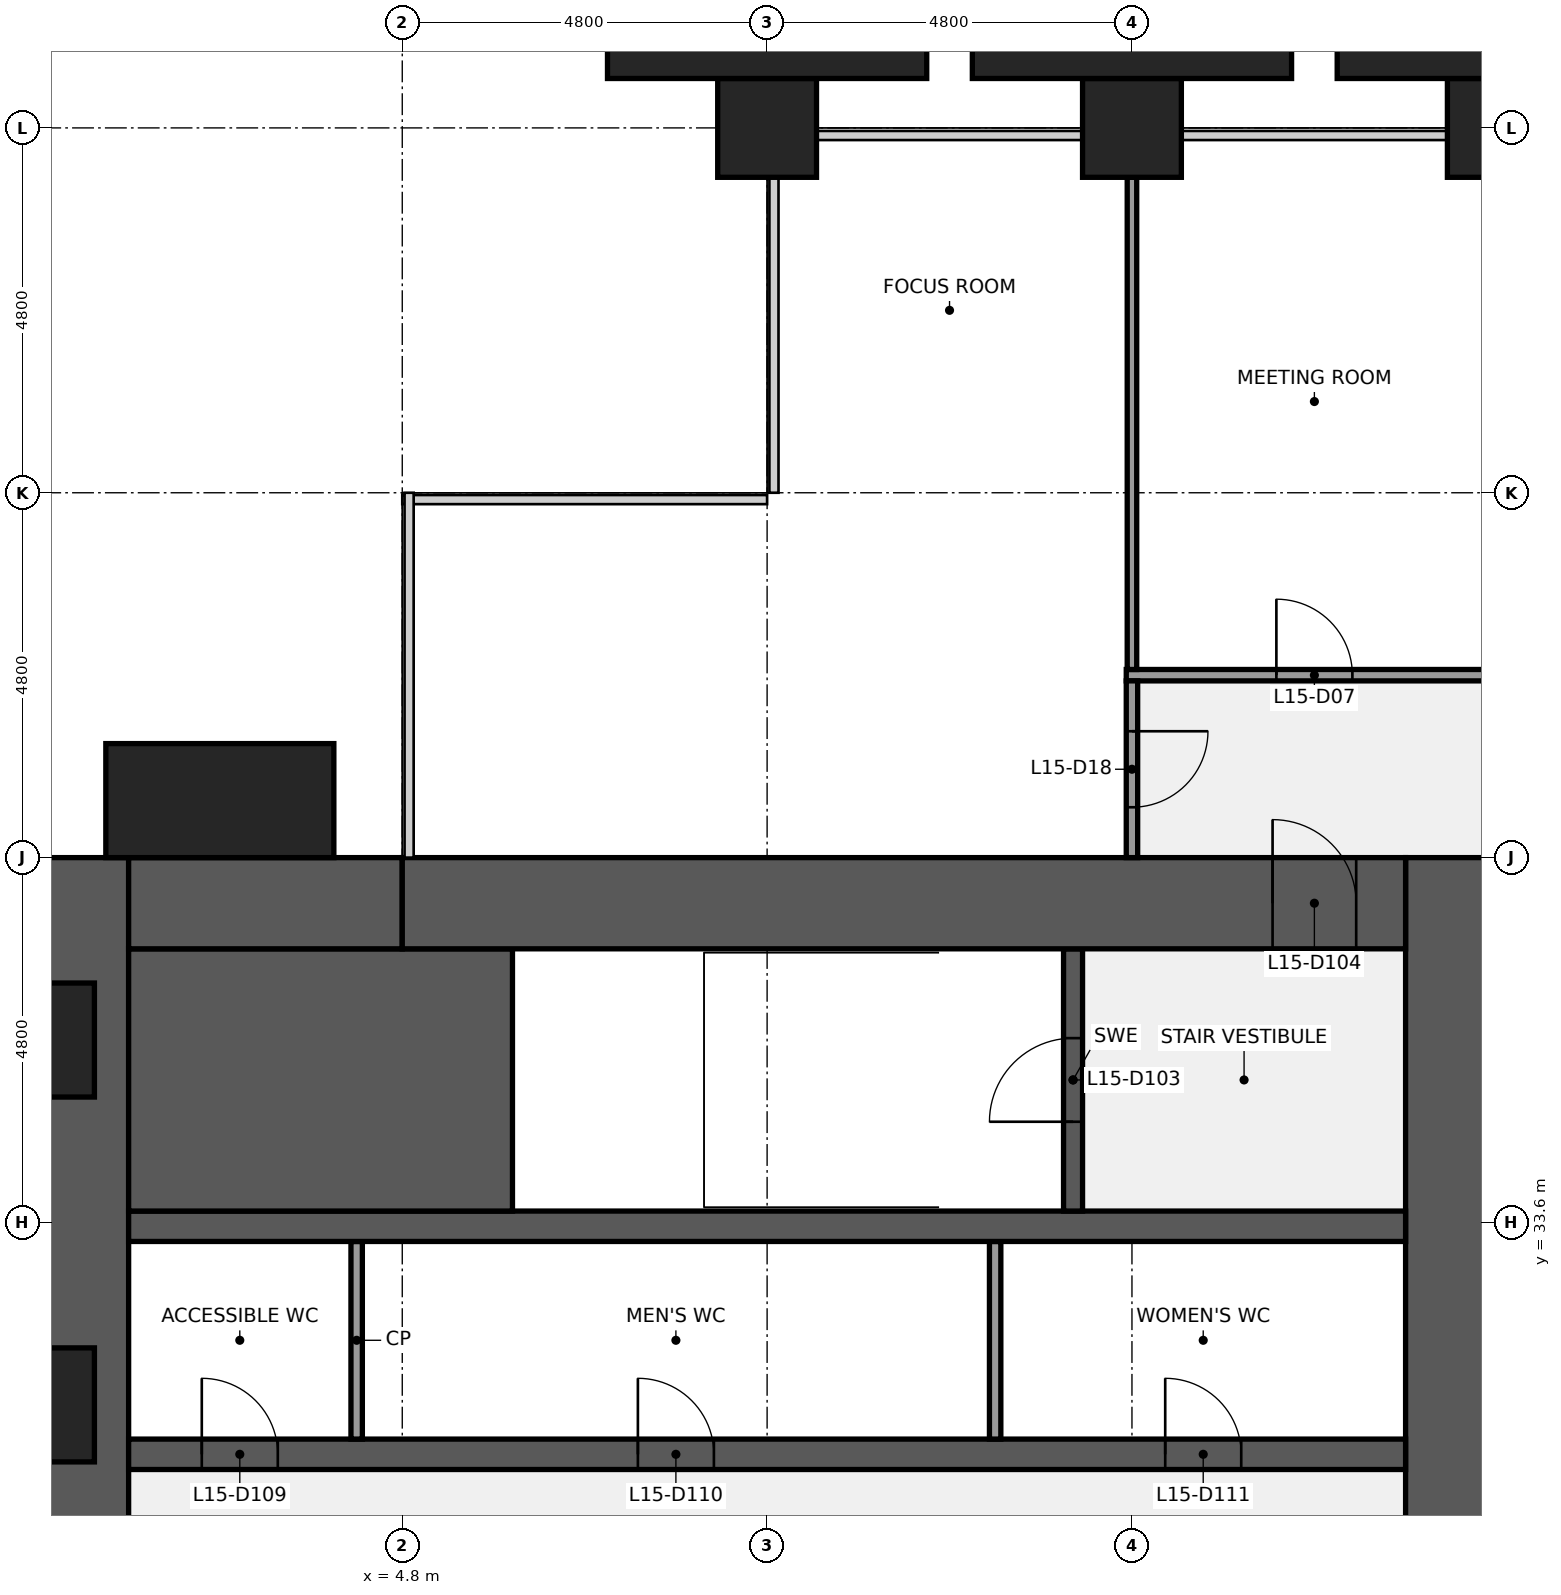
"""IFC4 building model, lengths in metres.
Left out: names, types, materials, properties, quantities, classifications, styles, units other than length and angle.
Written with IfcOpenShell. Run it as: python <this file> out.ifc"""

import sys

from ifc_helpers import new_model, si_unit, direction, frame, frame_2d, origin, origin_2d, place, context, subcontext, project, spatial, rectangle, extrude, element, fill, save


model = new_model("IFC4")
c1 = context("Model", 3, precision=1e-05, world=origin(), true_north=direction((0.0, 1.0)))
c2 = subcontext(c1, "Body", "Model", "MODEL_VIEW")
j1 = project(units=[si_unit("LENGTHUNIT", "METRE"), si_unit("PLANEANGLEUNIT", "RADIAN")], contexts=[c1])
p1 = place(None, origin())
s1 = spatial("IfcSite", under=j1, at=p1, CompositionType="ELEMENT")
p2 = place(p1, origin())
s2 = spatial("IfcBuilding", under=s1, at=p2, CompositionType="ELEMENT")
p3 = place(p2, frame((0.0, 0.0, 71.0)))
s3 = spatial("IfcBuildingStorey", under=s2, at=p3, CompositionType="ELEMENT", Elevation=71.0)
for number, where, z_axis, x_axis in (
    (1, (9.6, 48.0, 0.0), (0.0, 0.0, 1.0), (1.0, 0.0, 0.0)),
    (2, (14.4, 48.0, 0.0), (0.0, 0.0, 1.0), (1.0, 0.0, 0.0)),
    (3, (19.2, 48.0, 0.0), (0.0, 0.0, 1.0), (1.0, 0.0, 0.0)),
):
    element("IfcColumn", number, at=place(p3, frame(where, z_axis=z_axis, x_axis=x_axis)), inside=s3, PredefinedType="COLUMN", context=c2, shape_type="SweptSolid", body=[
        extrude(rectangle(XDim=1.3, YDim=1.3, at=origin_2d()), origin(), (0.0, 0.0, 1.0), 4.0),
    ])
p4 = place(p3, frame((0.6, 9.6, 0.0), z_axis=(0.0, 0.0, 1.0), x_axis=(0.0, 1.0, 0.0)))
e4 = element("IfcWall", 4, at=p4, inside=s3, PredefinedType="SHEAR", context=c2, shape_type="SweptSolid", body=[
    extrude(rectangle(XDim=28.8, YDim=1.2, at=frame_2d((14.4, 0.0))), origin(), (0.0, 0.0, 1.0), 3.84),
])
p5 = place(p4, frame((8.85, 0.0, 0.9)))
e5 = element("IfcOpeningElement", 5, at=p5, cuts=e4, PredefinedType="OPENING", context=c2, shape_type="SweptSolid", body=[
    extrude(rectangle(XDim=1.5, YDim=1.5, at=frame_2d((0.75, 0.75))), frame((0.0, 0.61, 0.0), z_axis=(0.0, -1.0, 0.0), x_axis=(1.0, 0.0, 0.0)), (0.0, 0.0, 1.0), 1.22),
])
p6 = place(p4, frame((18.45, 0.0, 0.9)))
e6 = element("IfcOpeningElement", 6, at=p6, cuts=e4, PredefinedType="OPENING", context=c2, shape_type="SweptSolid", body=[
    extrude(rectangle(XDim=1.5, YDim=1.5, at=frame_2d((0.75, 0.75))), frame((0.0, 0.61, 0.0), z_axis=(0.0, -1.0, 0.0), x_axis=(1.0, 0.0, 0.0)), (0.0, 0.0, 1.0), 1.22),
])
p7 = place(p3, frame((18.6, 38.4, 0.0), z_axis=(0.0, 0.0, 1.0), x_axis=(0.0, -1.0, 0.0)))
e7 = element("IfcWall", 7, at=p7, inside=s3, PredefinedType="SHEAR", context=c2, shape_type="SweptSolid", body=[
    extrude(rectangle(XDim=28.8, YDim=1.2, at=frame_2d((14.4, 0.0))), origin(), (0.0, 0.0, 1.0), 3.84),
])
p8 = place(p7, frame((18.3, 0.0, 0.0)))
e8 = element("IfcOpeningElement", 8, at=p8, cuts=e7, PredefinedType="OPENING", context=c2, shape_type="SweptSolid", body=[
    extrude(rectangle(XDim=1.8, YDim=2.1, at=frame_2d((0.9, 1.05))), frame((0.0, 0.61, 0.0), z_axis=(0.0, -1.0, 0.0), x_axis=(1.0, 0.0, 0.0)), (0.0, 0.0, 1.0), 1.22),
])
p9 = place(p7, frame((8.7, 0.0, 0.0)))
e9 = element("IfcOpeningElement", 9, at=p9, cuts=e7, PredefinedType="OPENING", context=c2, shape_type="SweptSolid", body=[
    extrude(rectangle(XDim=1.8, YDim=2.1, at=frame_2d((0.9, 1.05))), frame((0.0, 0.61, 0.0), z_axis=(0.0, -1.0, 0.0), x_axis=(1.0, 0.0, 0.0)), (0.0, 0.0, 1.0), 1.22),
])
p10 = place(p3, frame((1.2, 30.55, 0.0), z_axis=(0.0, 0.0, 1.0), x_axis=(1.0, 0.0, 0.0)))
e10 = element("IfcWall", 10, at=p10, inside=s3, PredefinedType="SHEAR", context=c2, shape_type="SweptSolid", body=[
    extrude(rectangle(XDim=16.8, YDim=0.4, at=frame_2d((8.4, 0.0))), origin(), (0.0, 0.0, 1.0), 3.84),
])
p11 = place(p10, frame((0.962, 0.0, 0.0)))
e11 = element("IfcOpeningElement", 11, at=p11, cuts=e10, PredefinedType="OPENING", context=c2, shape_type="SweptSolid", body=[
    extrude(rectangle(XDim=1.0, YDim=2.1, at=frame_2d((0.5, 1.05))), frame((0.0, 0.21, 0.0), z_axis=(0.0, -1.0, 0.0), x_axis=(1.0, 0.0, 0.0)), (0.0, 0.0, 1.0), 0.42),
])
p12 = place(p10, frame((6.7, 0.0, 0.0)))
e12 = element("IfcOpeningElement", 12, at=p12, cuts=e10, PredefinedType="OPENING", context=c2, shape_type="SweptSolid", body=[
    extrude(rectangle(XDim=1.0, YDim=2.1, at=frame_2d((0.5, 1.05))), frame((0.0, 0.21, 0.0), z_axis=(0.0, -1.0, 0.0), x_axis=(1.0, 0.0, 0.0)), (0.0, 0.0, 1.0), 0.42),
])
p13 = place(p10, frame((13.637, 0.0, 0.0)))
e13 = element("IfcOpeningElement", 13, at=p13, cuts=e10, PredefinedType="OPENING", context=c2, shape_type="SweptSolid", body=[
    extrude(rectangle(XDim=1.0, YDim=2.1, at=frame_2d((0.5, 1.05))), frame((0.0, 0.21, 0.0), z_axis=(0.0, -1.0, 0.0), x_axis=(1.0, 0.0, 0.0)), (0.0, 0.0, 1.0), 0.42),
])
for number, where, z_axis, x_axis in (
    (14, (4.2, 30.75, 0.0), (0.0, 0.0, 1.0), (0.0, 1.0, 0.0)),
    (15, (12.6, 30.75, 0.0), (0.0, 0.0, 1.0), (0.0, 1.0, 0.0)),
):
    element("IfcWall", number, at=place(p3, frame(where, z_axis=z_axis, x_axis=x_axis)), inside=s3, PredefinedType="PARTITIONING", context=c2, shape_type="SweptSolid", body=[
        extrude(rectangle(XDim=2.6, YDim=0.15, at=frame_2d((1.3, 0.0))), origin(), (0.0, 0.0, 1.0), 3.84),
    ])
p14 = place(p3, frame((1.2, 33.55, 0.0), z_axis=(0.0, 0.0, 1.0), x_axis=(1.0, 0.0, 0.0)))
e16 = element("IfcWall", 16, at=p14, inside=s3, PredefinedType="SHEAR", context=c2, shape_type="SweptSolid", body=[
    extrude(rectangle(XDim=16.8, YDim=0.4, at=frame_2d((8.4, 0.0))), origin(), (0.0, 0.0, 1.0), 3.84),
])
p15 = place(p3, frame((1.2, 35.475, 0.0), z_axis=(0.0, 0.0, 1.0), x_axis=(1.0, 0.0, 0.0)))
e17 = element("IfcWall", 17, at=p15, inside=s3, PredefinedType="SHEAR", context=c2, shape_type="SweptSolid", body=[
    extrude(rectangle(XDim=5.05, YDim=3.45, at=frame_2d((2.525, 0.0))), origin(), (0.0, 0.0, 1.0), 3.84),
])
p16 = place(p3, frame((13.625, 33.75, 0.0), z_axis=(0.0, 0.0, 1.0), x_axis=(0.0, 1.0, 0.0)))
e18 = element("IfcWall", 18, at=p16, inside=s3, PredefinedType="SHEAR", context=c2, shape_type="SweptSolid", body=[
    extrude(rectangle(XDim=3.45, YDim=0.25, at=frame_2d((1.725, 0.0))), origin(), (0.0, 0.0, 1.0), 3.84),
])
p17 = place(p16, frame((1.175, 0.0, 0.0)))
e19 = element("IfcOpeningElement", 19, at=p17, cuts=e18, PredefinedType="OPENING", context=c2, shape_type="SweptSolid", body=[
    extrude(rectangle(XDim=1.1, YDim=2.1, at=frame_2d((0.55, 1.05))), frame((0.0, 0.135, 0.0), z_axis=(0.0, -1.0, 0.0), x_axis=(1.0, 0.0, 0.0)), (0.0, 0.0, 1.0), 0.27),
])
p18 = place(p3, frame((1.2, 37.8, 0.0), z_axis=(0.0, 0.0, 1.0), x_axis=(1.0, 0.0, 0.0)))
e20 = element("IfcWall", 20, at=p18, inside=s3, PredefinedType="SHEAR", context=c2, shape_type="SweptSolid", body=[
    extrude(rectangle(XDim=3.6, YDim=1.2, at=frame_2d((1.8, 0.0))), origin(), (0.0, 0.0, 1.0), 3.84),
])
p19 = place(p3, frame((4.8, 37.8, 0.0), z_axis=(0.0, 0.0, 1.0), x_axis=(1.0, 0.0, 0.0)))
e21 = element("IfcWall", 21, at=p19, inside=s3, PredefinedType="SHEAR", context=c2, shape_type="SweptSolid", body=[
    extrude(rectangle(XDim=13.2, YDim=1.2, at=frame_2d((6.6, 0.0))), origin(), (0.0, 0.0, 1.0), 3.84),
])
p20 = place(p19, frame((11.45, 0.0, 0.0)))
e22 = element("IfcOpeningElement", 22, at=p20, cuts=e21, PredefinedType="OPENING", context=c2, shape_type="SweptSolid", body=[
    extrude(rectangle(XDim=1.1, YDim=2.1, at=frame_2d((0.55, 1.05))), frame((0.0, 0.61, 0.0), z_axis=(0.0, -1.0, 0.0), x_axis=(1.0, 0.0, 0.0)), (0.0, 0.0, 1.0), 1.22),
])
p21 = place(p3, frame((14.325, 40.8, 0.0), z_axis=(0.0, 0.0, 1.0), x_axis=(1.0, 0.0, 0.0)))
e23 = element("IfcWall", 23, at=p21, inside=s3, PredefinedType="PARTITIONING", context=c2, shape_type="SweptSolid", body=[
    extrude(rectangle(XDim=4.95, YDim=0.15, at=frame_2d((2.475, 0.0))), origin(), (0.0, 0.0, 1.0), 2.87),
])
p22 = place(p21, frame((1.975, 0.0, 0.0)))
e24 = element("IfcOpeningElement", 24, at=p22, cuts=e23, PredefinedType="OPENING", context=c2, shape_type="SweptSolid", body=[
    extrude(rectangle(XDim=1.0, YDim=2.1, at=frame_2d((0.5, 1.05))), frame((0.0, 0.085, 0.0), z_axis=(0.0, -1.0, 0.0), x_axis=(1.0, 0.0, 0.0)), (0.0, 0.0, 1.0), 0.17),
])
p23 = place(p3, frame((14.4, 40.875, 0.0), z_axis=(0.0, 0.0, 1.0), x_axis=(0.0, 1.0, 0.0)))
e25 = element("IfcWall", 25, at=p23, inside=s3, PredefinedType="PARTITIONING", context=c2, shape_type="SweptSolid", body=[
    extrude(rectangle(XDim=6.475, YDim=0.125, at=frame_2d((3.238, 0.0))), origin(), (0.0, 0.0, 1.0), 2.87),
])
p24 = place(p3, frame((14.4, 38.4, 0.0), z_axis=(0.0, 0.0, 1.0), x_axis=(0.0, 1.0, 0.0)))
e26 = element("IfcWall", 26, at=p24, inside=s3, PredefinedType="PARTITIONING", context=c2, shape_type="SweptSolid", body=[
    extrude(rectangle(XDim=2.325, YDim=0.15, at=frame_2d((1.163, 0.0))), origin(), (0.0, 0.0, 1.0), 2.87),
])
p25 = place(p24, frame((0.663, 0.0, 0.0)))
e27 = element("IfcOpeningElement", 27, at=p25, cuts=e26, PredefinedType="OPENING", context=c2, shape_type="SweptSolid", body=[
    extrude(rectangle(XDim=1.0, YDim=2.1, at=frame_2d((0.5, 1.05))), frame((0.0, 0.085, 0.0), z_axis=(0.0, -1.0, 0.0), x_axis=(1.0, 0.0, 0.0)), (0.0, 0.0, 1.0), 0.17),
])
p26 = place(p3, frame((2.4, 39.15, 0.0), z_axis=(0.0, 0.0, 1.0), x_axis=(1.0, 0.0, 0.0)))
e28 = element("IfcColumn", 28, at=p26, inside=s3, PredefinedType="PILASTER", context=c2, shape_type="SweptSolid", body=[
    extrude(rectangle(XDim=3.0, YDim=1.5, at=origin_2d()), origin(), (0.0, 0.0, 1.0), 4.0),
])
for number, where, z_axis, x_axis in (
    (29, (9.6, 49.075, 0.0), (0.0, 0.0, 1.0), (1.0, 0.0, 0.0)),
    (30, (14.4, 49.075, 0.0), (0.0, 0.0, 1.0), (1.0, 0.0, 0.0)),
    (31, (19.2, 49.075, 0.0), (0.0, 0.0, 1.0), (1.0, 0.0, 0.0)),
):
    element("IfcColumn", number, at=place(p3, frame(where, z_axis=z_axis, x_axis=x_axis)), inside=s3, PredefinedType="PILASTER", context=c2, shape_type="SweptSolid", body=[
        extrude(rectangle(XDim=4.2, YDim=0.85, at=origin_2d()), origin(), (0.0, 0.0, 1.0), 4.0),
    ])
p27 = place(p17, origin())
e32 = element("IfcDoor", 32, at=p27, inside=s3, OperationType="SINGLE_SWING_LEFT", PredefinedType="DOOR", context=c2, shape_type="SweptSolid", body=[
    extrude(rectangle(XDim=1.1, YDim=2.1, at=frame_2d((0.55, 1.05))), frame((0.0, 0.025, 0.0), z_axis=(0.0, -1.0, 0.0), x_axis=(1.0, 0.0, 0.0)), (0.0, 0.0, 1.0), 0.05),
])
fill(e19, e32)
p28 = place(p20, origin())
e33 = element("IfcDoor", 33, at=p28, inside=s3, OperationType="SINGLE_SWING_LEFT", PredefinedType="DOOR", context=c2, shape_type="SweptSolid", body=[
    extrude(rectangle(XDim=1.1, YDim=2.1, at=frame_2d((0.55, 1.05))), frame((0.0, 0.025, 0.0), z_axis=(0.0, -1.0, 0.0), x_axis=(1.0, 0.0, 0.0)), (0.0, 0.0, 1.0), 0.05),
])
fill(e22, e33)
p29 = place(p11, origin())
e34 = element("IfcDoor", 34, at=p29, inside=s3, OperationType="SINGLE_SWING_LEFT", PredefinedType="DOOR", context=c2, shape_type="SweptSolid", body=[
    extrude(rectangle(XDim=1.0, YDim=2.1, at=frame_2d((0.5, 1.05))), frame((0.0, 0.025, 0.0), z_axis=(0.0, -1.0, 0.0), x_axis=(1.0, 0.0, 0.0)), (0.0, 0.0, 1.0), 0.05),
])
fill(e11, e34)
p30 = place(p12, origin())
e35 = element("IfcDoor", 35, at=p30, inside=s3, OperationType="SINGLE_SWING_LEFT", PredefinedType="DOOR", context=c2, shape_type="SweptSolid", body=[
    extrude(rectangle(XDim=1.0, YDim=2.1, at=frame_2d((0.5, 1.05))), frame((0.0, 0.025, 0.0), z_axis=(0.0, -1.0, 0.0), x_axis=(1.0, 0.0, 0.0)), (0.0, 0.0, 1.0), 0.05),
])
fill(e12, e35)
p31 = place(p13, origin())
e36 = element("IfcDoor", 36, at=p31, inside=s3, OperationType="SINGLE_SWING_LEFT", PredefinedType="DOOR", context=c2, shape_type="SweptSolid", body=[
    extrude(rectangle(XDim=1.0, YDim=2.1, at=frame_2d((0.5, 1.05))), frame((0.0, 0.025, 0.0), z_axis=(0.0, -1.0, 0.0), x_axis=(1.0, 0.0, 0.0)), (0.0, 0.0, 1.0), 0.05),
])
fill(e13, e36)
p32 = place(p22, origin())
e37 = element("IfcDoor", 37, at=p32, inside=s3, OperationType="SINGLE_SWING_LEFT", PredefinedType="DOOR", context=c2, shape_type="SweptSolid", body=[
    extrude(rectangle(XDim=1.0, YDim=2.1, at=frame_2d((0.5, 1.05))), frame((0.0, 0.025, 0.0), z_axis=(0.0, -1.0, 0.0), x_axis=(1.0, 0.0, 0.0)), (0.0, 0.0, 1.0), 0.05),
])
fill(e24, e37)
p33 = place(p25, origin())
e38 = element("IfcDoor", 38, at=p33, inside=s3, OperationType="SINGLE_SWING_RIGHT", PredefinedType="DOOR", context=c2, shape_type="SweptSolid", body=[
    extrude(rectangle(XDim=1.0, YDim=2.1, at=frame_2d((0.5, 1.05))), frame((0.0, 0.025, 0.0), z_axis=(0.0, -1.0, 0.0), x_axis=(1.0, 0.0, 0.0)), (0.0, 0.0, 1.0), 0.05),
])
fill(e27, e38)
save(model, sys.argv[1])
